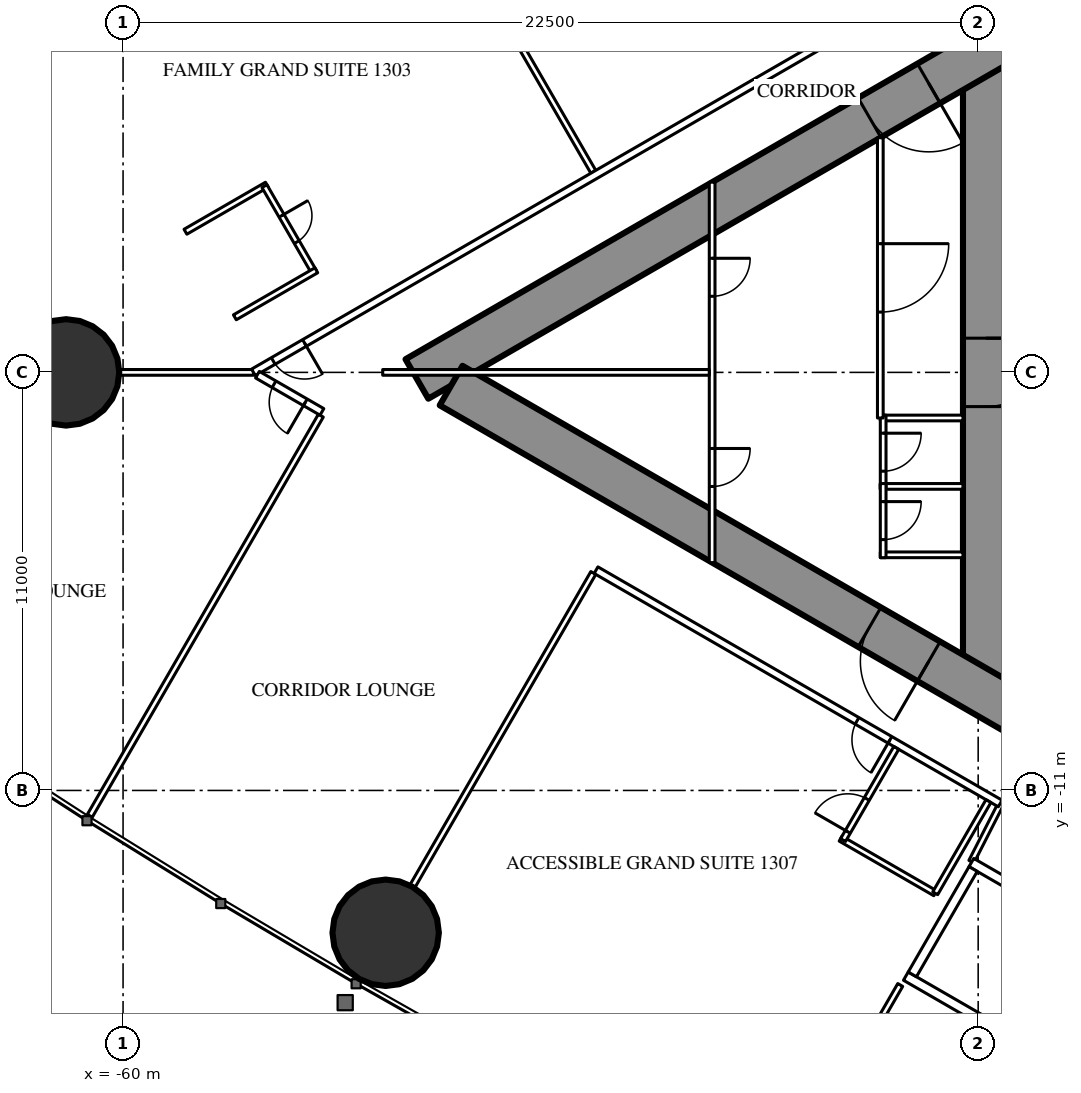
"""IFC4 building model, lengths in metres.
Left out: names, types, materials, properties, quantities, classifications, styles, units other than length and angle.
Written with IfcOpenShell. Run it as: python <this file> out.ifc"""

import sys

from ifc_helpers import new_model, si_unit, direction, frame, frame_2d, origin, origin_2d, place, context, subcontext, project, spatial, rectangle, hollow_circle, extrude, element, fill, save


model = new_model("IFC4")
c1 = context("Model", 3, precision=1e-05, world=origin(), true_north=direction((0.0, 1.0)))
c2 = subcontext(c1, "Body", "Model", "MODEL_VIEW")
j1 = project(units=[si_unit("LENGTHUNIT", "METRE"), si_unit("PLANEANGLEUNIT", "RADIAN")], contexts=[c1])
p1 = place(None, origin())
s1 = spatial("IfcSite", under=j1, at=p1, CompositionType="ELEMENT")
p2 = place(p1, origin())
s2 = spatial("IfcBuilding", under=s1, at=p2, CompositionType="ELEMENT")
p3 = place(p2, frame((0.0, 0.0, 53.0)))
s3 = spatial("IfcBuildingStorey", under=s2, at=p3, CompositionType="ELEMENT", Elevation=53.0)
p4 = place(p3, frame((-53.09, -14.745, 0.0), z_axis=(0.0, 0.0, 1.0), x_axis=(1.0, 0.0, 0.0)))
e1 = element("IfcColumn", 1, at=p4, inside=s3, PredefinedType="COLUMN", context=c2, shape_type="SweptSolid", body=[
    extrude(hollow_circle(Radius=1.4, WallThickness=0.12, at=origin_2d()), origin(), (0.0, 0.0, 1.0), 3.5),
])
p5 = place(p3, frame((-61.5, 0.0, 0.0), z_axis=(0.0, 0.0, 1.0), x_axis=(1.0, 0.0, 0.0)))
e2 = element("IfcColumn", 2, at=p5, inside=s3, PredefinedType="COLUMN", context=c2, shape_type="SweptSolid", body=[
    extrude(hollow_circle(Radius=1.4, WallThickness=0.1, at=origin_2d()), origin(), (0.0, 0.0, 1.0), 3.5),
])
p6 = place(p3, frame((-37.3, 8.6, 0.0), z_axis=(0.0, 0.0, 1.0), x_axis=(0.0, -1.0, 0.0)))
e3 = element("IfcWall", 3, at=p6, inside=s3, PredefinedType="SHEAR", context=c2, shape_type="SweptSolid", body=[
    extrude(rectangle(XDim=17.2, YDim=1.2, at=frame_2d((8.6, 0.0))), origin(), (0.0, 0.0, 1.0), 3.5),
])
p7 = place(p6, frame((7.7, 0.0, 0.0)))
e4 = element("IfcOpeningElement", 4, at=p7, cuts=e3, PredefinedType="OPENING", context=c2, shape_type="SweptSolid", body=[
    extrude(rectangle(XDim=1.8, YDim=2.2, at=frame_2d((0.9, 1.1))), frame((0.0, 0.61, 0.0), z_axis=(0.0, -1.0, 0.0), x_axis=(1.0, 0.0, 0.0)), (0.0, 0.0, 1.0), 1.22),
])
p8 = place(p3, frame((-27.2, 14.3, 0.0), z_axis=(0.0, 0.0, 1.0), x_axis=(-0.866026593062, -0.499997940104, 0.0)))
e5 = element("IfcWall", 5, at=p8, inside=s3, PredefinedType="SHEAR", context=c2, shape_type="SweptSolid", body=[
    extrude(rectangle(XDim=28.946, YDim=1.2, at=frame_2d((14.473, 0.0))), origin(), (0.0, 0.0, 1.0), 3.5),
])
p9 = place(p8, frame((4.6, 0.0, 0.0)))
e6 = element("IfcOpeningElement", 6, at=p9, cuts=e5, PredefinedType="OPENING", context=c2, shape_type="SweptSolid", body=[
    extrude(rectangle(XDim=1.0, YDim=2.2, at=frame_2d((0.5, 1.1))), frame((0.0, 0.61, 0.0), z_axis=(0.0, -1.0, 0.0), x_axis=(1.0, 0.0, 0.0)), (0.0, 0.0, 1.0), 1.22),
])
p10 = place(p8, frame((13.395, 0.0, 0.0)))
e7 = element("IfcOpeningElement", 7, at=p10, cuts=e5, PredefinedType="OPENING", context=c2, shape_type="SweptSolid", body=[
    extrude(rectangle(XDim=1.8, YDim=2.2, at=frame_2d((0.9, 1.1))), frame((0.0, 0.61, 0.0), z_axis=(0.0, -1.0, 0.0), x_axis=(1.0, 0.0, 0.0)), (0.0, 0.0, 1.0), 1.22),
])
p11 = place(p3, frame((-27.2, -14.3, 0.0), z_axis=(0.0, 0.0, 1.0), x_axis=(-0.866024021859, 0.500002393557, 0.0)))
e8 = element("IfcWall", 8, at=p11, inside=s3, PredefinedType="SHEAR", context=c2, shape_type="SweptSolid", body=[
    extrude(rectangle(XDim=27.907, YDim=1.2, at=frame_2d((13.954, 0.0))), origin(), (0.0, 0.0, 1.0), 3.5),
])
p12 = place(p11, frame((4.6, 0.0, 0.0)))
e9 = element("IfcOpeningElement", 9, at=p12, cuts=e8, PredefinedType="OPENING", context=c2, shape_type="SweptSolid", body=[
    extrude(rectangle(XDim=1.0, YDim=2.2, at=frame_2d((0.5, 1.1))), frame((0.0, 0.61, 0.0), z_axis=(0.0, -1.0, 0.0), x_axis=(1.0, 0.0, 0.0)), (0.0, 0.0, 1.0), 1.22),
])
p13 = place(p11, frame((13.395, 0.0, 0.0)))
e10 = element("IfcOpeningElement", 10, at=p13, cuts=e8, PredefinedType="OPENING", context=c2, shape_type="SweptSolid", body=[
    extrude(rectangle(XDim=1.8, YDim=2.2, at=frame_2d((0.9, 1.1))), frame((0.0, 0.61, 0.0), z_axis=(0.0, -1.0, 0.0), x_axis=(1.0, 0.0, 0.0)), (0.0, 0.0, 1.0), 1.22),
])
for number, where, z_axis, x_axis in (
    (11, (-47.627, 5.278, 0.0), (0.0, 0.0, 1.0), (-0.5, 0.866, 0.0)),
    (12, (-47.627, -5.278, 0.0), (0.0, 0.0, 1.0), (-0.5, -0.866, 0.0)),
):
    element("IfcWall", number, at=place(p3, frame(where, z_axis=z_axis, x_axis=x_axis)), inside=s3, PredefinedType="PARTITIONING", context=c2, shape_type="SweptSolid", body=[
        extrude(rectangle(XDim=9.51, YDim=0.15, at=frame_2d((4.755, 0.0))), origin(), (0.0, 0.0, 1.0), 2.25),
    ])
p14 = place(p3, frame((-54.796, -1.139, 0.0), z_axis=(0.0, 0.0, 1.0), x_axis=(-0.499998860433, -0.866026061713, 0.0)))
e13 = element("IfcWall", 13, at=p14, inside=s3, PredefinedType="PARTITIONING", context=c2, shape_type="SweptSolid", body=[
    extrude(rectangle(XDim=12.157, YDim=0.15, at=frame_2d((6.078, 0.0))), origin(), (0.0, 0.0, 1.0), 3.25),
])
p15 = place(p3, frame((-56.568, 0.0, 0.0), z_axis=(0.0, 0.0, 1.0), x_axis=(-1.0, 0.0, 0.0)))
e14 = element("IfcWall", 14, at=p15, inside=s3, PredefinedType="PARTITIONING", context=c2, shape_type="SweptSolid", body=[
    extrude(rectangle(XDim=16.247, YDim=0.15, at=frame_2d((8.124, 0.0))), origin(), (0.0, 0.0, 1.0), 2.25),
])
p16 = place(p3, frame((-39.551, -16.118, 0.0), z_axis=(0.0, 0.0, 1.0), x_axis=(-0.499986503906, -0.866033195618, 0.0)))
e15 = element("IfcWall", 15, at=p16, inside=s3, PredefinedType="PARTITIONING", context=c2, shape_type="SweptSolid", body=[
    extrude(rectangle(XDim=3.815, YDim=0.15, at=frame_2d((1.907, 0.0))), origin(), (0.0, 0.0, 1.0), 3.25),
])
p17 = place(p3, frame((-37.7, 10.894, 0.0), z_axis=(0.0, 0.0, 1.0), x_axis=(-0.866027905338, -0.499995667157, 0.0)))
e16 = element("IfcWall", 16, at=p17, inside=s3, PredefinedType="PARTITIONING", context=c2, shape_type="SweptSolid", body=[
    extrude(rectangle(XDim=21.787, YDim=0.2, at=frame_2d((10.894, 0.0))), origin(), (0.0, 0.0, 1.0), 3.25),
])
p18 = place(p17, frame((20.237, 0.0, 0.0)))
e17 = element("IfcOpeningElement", 17, at=p18, cuts=e16, PredefinedType="OPENING", context=c2, shape_type="SweptSolid", body=[
    extrude(rectangle(XDim=0.95, YDim=2.2, at=frame_2d((0.475, 1.1))), frame((0.0, 0.11, 0.0), z_axis=(0.0, -1.0, 0.0), x_axis=(1.0, 0.0, 0.0)), (0.0, 0.0, 1.0), 0.22),
])
p19 = place(p17, frame((2.95, 0.0, 0.0)))
e18 = element("IfcOpeningElement", 18, at=p19, cuts=e16, PredefinedType="OPENING", context=c2, shape_type="SweptSolid", body=[
    extrude(rectangle(XDim=0.95, YDim=2.2, at=frame_2d((0.475, 1.1))), frame((0.0, 0.11, 0.0), z_axis=(0.0, -1.0, 0.0), x_axis=(1.0, 0.0, 0.0)), (0.0, 0.0, 1.0), 0.22),
])
p20 = place(p3, frame((-36.857, -11.265, 0.0), z_axis=(0.0, 0.0, 1.0), x_axis=(-0.454225294761, -0.890886851176, 0.0)))
e19 = element("IfcWall", 19, at=p20, inside=s3, PredefinedType="PARTITIONING", context=c2, shape_type="SweptSolid", body=[
    extrude(rectangle(XDim=1.807, YDim=0.15, at=frame_2d((0.904, 0.0))), origin(), (0.0, 0.0, 1.0), 3.25),
])
p21 = place(p3, frame((-36.92, -11.344, 0.0), z_axis=(0.0, 0.0, 1.0), x_axis=(-0.866025017052, 0.500000669839, 0.0)))
e20 = element("IfcWall", 20, at=p21, inside=s3, PredefinedType="PARTITIONING", context=c2, shape_type="SweptSolid", body=[
    extrude(rectangle(XDim=12.28, YDim=0.2, at=frame_2d((6.14, 0.0))), origin(), (0.0, 0.0, 1.0), 3.25),
])
p22 = place(p21, frame((3.35, 0.0, 0.0)))
e21 = element("IfcOpeningElement", 21, at=p22, cuts=e20, PredefinedType="OPENING", context=c2, shape_type="SweptSolid", body=[
    extrude(rectangle(XDim=1.0, YDim=2.2, at=frame_2d((0.5, 1.1))), frame((0.0, 0.11, 0.0), z_axis=(0.0, -1.0, 0.0), x_axis=(1.0, 0.0, 0.0)), (0.0, 0.0, 1.0), 0.22),
])
p23 = place(p3, frame((-54.768, -1.04, 0.0), z_axis=(0.0, 0.0, 1.0), x_axis=(-0.866056934013, 0.499945384066, 0.0)))
e22 = element("IfcWall", 22, at=p23, inside=s3, PredefinedType="PARTITIONING", context=c2, shape_type="SweptSolid", body=[
    extrude(rectangle(XDim=1.959, YDim=0.2, at=frame_2d((0.979, 0.0))), origin(), (0.0, 0.0, 1.0), 3.25),
])
p24 = place(p23, frame((0.505, 0.0, 0.0)))
e23 = element("IfcOpeningElement", 23, at=p24, cuts=e22, PredefinedType="OPENING", context=c2, shape_type="SweptSolid", body=[
    extrude(rectangle(XDim=0.95, YDim=2.2, at=frame_2d((0.475, 1.1))), frame((0.0, 0.11, 0.0), z_axis=(0.0, -1.0, 0.0), x_axis=(1.0, 0.0, 0.0)), (0.0, 0.0, 1.0), 0.22),
])
p25 = place(p3, frame((-56.215, 4.938, 0.0), z_axis=(0.0, 0.0, 1.0), x_axis=(-0.866006523861, -0.500032699561, 0.0)))
e24 = element("IfcWall", 24, at=p25, inside=s3, PredefinedType="PARTITIONING", context=c2, shape_type="SweptSolid", body=[
    extrude(rectangle(XDim=2.475, YDim=0.15, at=frame_2d((1.237, 0.0))), origin(), (0.0, 0.0, 1.0), 3.25),
])
p26 = place(p3, frame((-54.98, 2.649, 0.0), z_axis=(0.0, 0.0, 1.0), x_axis=(-0.500006934395, 0.866021400173, 0.0)))
e25 = element("IfcWall", 25, at=p26, inside=s3, PredefinedType="PARTITIONING", context=c2, shape_type="SweptSolid", body=[
    extrude(rectangle(XDim=2.6, YDim=0.15, at=frame_2d((1.3, 0.0))), origin(), (0.0, 0.0, 1.0), 3.25),
])
p27 = place(p26, frame((0.9, 0.0, 0.0)))
e26 = element("IfcOpeningElement", 26, at=p27, cuts=e25, PredefinedType="OPENING", context=c2, shape_type="SweptSolid", body=[
    extrude(rectangle(XDim=0.8, YDim=2.2, at=frame_2d((0.4, 1.1))), frame((0.0, 0.085, 0.0), z_axis=(0.0, -1.0, 0.0), x_axis=(1.0, 0.0, 0.0)), (0.0, 0.0, 1.0), 0.17),
])
p28 = place(p3, frame((-54.915, 2.687, 0.0), z_axis=(0.0, 0.0, 1.0), x_axis=(-0.866006523861, -0.500032699561, 0.0)))
e27 = element("IfcWall", 27, at=p28, inside=s3, PredefinedType="PARTITIONING", context=c2, shape_type="SweptSolid", body=[
    extrude(rectangle(XDim=2.475, YDim=0.15, at=frame_2d((1.237, 0.0))), origin(), (0.0, 0.0, 1.0), 3.25),
])
p29 = place(p3, frame((-38.63, -13.705, 0.0), z_axis=(0.0, 0.0, 1.0), x_axis=(-0.866018712932, 0.500011588718, 0.0)))
e28 = element("IfcWall", 28, at=p29, inside=s3, PredefinedType="PARTITIONING", context=c2, shape_type="SweptSolid", body=[
    extrude(rectangle(XDim=2.875, YDim=0.15, at=frame_2d((1.438, 0.0))), origin(), (0.0, 0.0, 1.0), 3.25),
])
p30 = place(p3, frame((-39.655, -9.88, 0.0), z_axis=(0.0, 0.0, 1.0), x_axis=(-0.500049511043, -0.865996816683, 0.0)))
e29 = element("IfcWall", 29, at=p30, inside=s3, PredefinedType="PARTITIONING", context=c2, shape_type="SweptSolid", body=[
    extrude(rectangle(XDim=2.8, YDim=0.15, at=frame_2d((1.4, 0.0))), origin(), (0.0, 0.0, 1.0), 3.25),
])
p31 = place(p30, frame((1.55, 0.0, 0.0)))
e30 = element("IfcOpeningElement", 30, at=p31, cuts=e29, PredefinedType="OPENING", context=c2, shape_type="SweptSolid", body=[
    extrude(rectangle(XDim=1.0, YDim=2.2, at=frame_2d((0.5, 1.1))), frame((0.0, 0.085, 0.0), z_axis=(0.0, -1.0, 0.0), x_axis=(1.0, 0.0, 0.0)), (0.0, 0.0, 1.0), 0.17),
])
p32 = place(p3, frame((-37.23, -11.281, 0.0), z_axis=(0.0, 0.0, 1.0), x_axis=(-0.500049511043, -0.865996816683, 0.0)))
e31 = element("IfcWall", 31, at=p32, inside=s3, PredefinedType="PARTITIONING", context=c2, shape_type="SweptSolid", body=[
    extrude(rectangle(XDim=2.8, YDim=0.15, at=frame_2d((1.4, 0.0))), origin(), (0.0, 0.0, 1.0), 3.25),
])
for number, where, z_axis, x_axis in (
    (32, (-37.9, -1.2, 0.0), (0.0, 0.0, 1.0), (-1.0, 0.0, 0.0)),
    (33, (-37.9, -3.0, 0.0), (0.0, 0.0, 1.0), (-1.0, 0.0, 0.0)),
    (34, (-37.9, -4.8, 0.0), (0.0, 0.0, 1.0), (-1.0, 0.0, 0.0)),
):
    element("IfcWall", number, at=place(p3, frame(where, z_axis=z_axis, x_axis=x_axis)), inside=s3, PredefinedType="PARTITIONING", context=c2, shape_type="SweptSolid", body=[
        extrude(rectangle(XDim=2.175, YDim=0.15, at=frame_2d((1.087, 0.0))), origin(), (0.0, 0.0, 1.0), 3.25),
    ])
p33 = place(p3, frame((-40.0, -1.125, 0.0), z_axis=(0.0, 0.0, 1.0), x_axis=(0.0, -1.0, 0.0)))
e35 = element("IfcWall", 35, at=p33, inside=s3, PredefinedType="PARTITIONING", context=c2, shape_type="SweptSolid", body=[
    extrude(rectangle(XDim=1.95, YDim=0.15, at=frame_2d((0.975, 0.0))), origin(), (0.0, 0.0, 1.0), 3.25),
])
p34 = place(p33, frame((0.475, 0.0, 0.0)))
e36 = element("IfcOpeningElement", 36, at=p34, cuts=e35, PredefinedType="OPENING", context=c2, shape_type="SweptSolid", body=[
    extrude(rectangle(XDim=1.0, YDim=2.2, at=frame_2d((0.5, 1.1))), frame((0.0, 0.085, 0.0), z_axis=(0.0, -1.0, 0.0), x_axis=(1.0, 0.0, 0.0)), (0.0, 0.0, 1.0), 0.17),
])
p35 = place(p3, frame((-40.0, -2.925, 0.0), z_axis=(0.0, 0.0, 1.0), x_axis=(0.0, -1.0, 0.0)))
e37 = element("IfcWall", 37, at=p35, inside=s3, PredefinedType="PARTITIONING", context=c2, shape_type="SweptSolid", body=[
    extrude(rectangle(XDim=1.95, YDim=0.15, at=frame_2d((0.975, 0.0))), origin(), (0.0, 0.0, 1.0), 3.25),
])
p36 = place(p35, frame((0.475, 0.0, 0.0)))
e38 = element("IfcOpeningElement", 38, at=p36, cuts=e37, PredefinedType="OPENING", context=c2, shape_type="SweptSolid", body=[
    extrude(rectangle(XDim=1.0, YDim=2.2, at=frame_2d((0.5, 1.1))), frame((0.0, 0.085, 0.0), z_axis=(0.0, -1.0, 0.0), x_axis=(1.0, 0.0, 0.0)), (0.0, 0.0, 1.0), 0.17),
])
p37 = place(p3, frame((-40.075, 6.174, 0.0), z_axis=(0.0, 0.0, 1.0), x_axis=(0.0, -1.0, 0.0)))
e39 = element("IfcWall", 39, at=p37, inside=s3, PredefinedType="PARTITIONING", context=c2, shape_type="SweptSolid", body=[
    extrude(rectangle(XDim=7.374, YDim=0.15, at=frame_2d((3.687, 0.0))), origin(), (0.0, 0.0, 1.0), 3.25),
])
p38 = place(p37, frame((2.787, 0.0, 0.0)))
e40 = element("IfcOpeningElement", 40, at=p38, cuts=e39, PredefinedType="OPENING", context=c2, shape_type="SweptSolid", body=[
    extrude(rectangle(XDim=1.8, YDim=2.2, at=frame_2d((0.9, 1.1))), frame((0.0, 0.085, 0.0), z_axis=(0.0, -1.0, 0.0), x_axis=(1.0, 0.0, 0.0)), (0.0, 0.0, 1.0), 0.17),
])
p39 = place(p3, frame((-44.5, 5.005, 0.0), z_axis=(0.0, 0.0, 1.0), x_axis=(0.0, -1.0, 0.0)))
e41 = element("IfcWall", 41, at=p39, inside=s3, PredefinedType="PARTITIONING", context=c2, shape_type="SweptSolid", body=[
    extrude(rectangle(XDim=10.009, YDim=0.15, at=frame_2d((5.005, 0.0))), origin(), (0.0, 0.0, 1.0), 2.45),
])
p40 = place(p39, frame((2.002, 0.0, 0.0)))
e42 = element("IfcOpeningElement", 42, at=p40, cuts=e41, PredefinedType="OPENING", context=c2, shape_type="SweptSolid", body=[
    extrude(rectangle(XDim=1.0, YDim=2.2, at=frame_2d((0.5, 1.1))), frame((0.0, 0.085, 0.0), z_axis=(0.0, -1.0, 0.0), x_axis=(1.0, 0.0, 0.0)), (0.0, 0.0, 1.0), 0.17),
])
p41 = place(p39, frame((7.007, 0.0, 0.0)))
e43 = element("IfcOpeningElement", 43, at=p41, cuts=e41, PredefinedType="OPENING", context=c2, shape_type="SweptSolid", body=[
    extrude(rectangle(XDim=1.0, YDim=2.2, at=frame_2d((0.5, 1.1))), frame((0.0, 0.085, 0.0), z_axis=(0.0, -1.0, 0.0), x_axis=(1.0, 0.0, 0.0)), (0.0, 0.0, 1.0), 0.17),
])
p42 = place(p3, frame((-44.575, 0.0, 0.0), z_axis=(0.0, 0.0, 1.0), x_axis=(-1.0, 0.0, 0.0)))
e44 = element("IfcWall", 44, at=p42, inside=s3, PredefinedType="PARTITIONING", context=c2, shape_type="SweptSolid", body=[
    extrude(rectangle(XDim=8.593, YDim=0.15, at=frame_2d((4.297, 0.0))), origin(), (0.0, 0.0, 1.0), 2.25),
])
p43 = place(p3, frame((-33.696, -15.197, 0.0), z_axis=(0.0, 0.0, 1.0), x_axis=(-0.865976953817, 0.500083908417, 0.0)))
e45 = element("IfcWall", 45, at=p43, inside=s3, PredefinedType="PARTITIONING", context=c2, shape_type="SweptSolid", body=[
    extrude(rectangle(XDim=4.599, YDim=0.25, at=frame_2d((2.3, 0.0))), origin(), (0.0, 0.0, 1.0), 3.25),
])
p44 = place(p3, frame((-35.42, -18.186, 0.0), z_axis=(0.0, 0.0, 1.0), x_axis=(-0.865990227814, 0.50006092162, 0.0)))
e46 = element("IfcWall", 46, at=p44, inside=s3, PredefinedType="PARTITIONING", context=c2, shape_type="SweptSolid", body=[
    extrude(rectangle(XDim=4.6, YDim=0.25, at=frame_2d((2.3, 0.0))), origin(), (0.0, 0.0, 1.0), 3.25),
])
p45 = place(p3, frame((-37.633, -13.068, 0.0), z_axis=(0.0, 0.0, 1.0), x_axis=(-0.499872130319, -0.866099216793, 0.0)))
e47 = element("IfcWall", 47, at=p45, inside=s3, PredefinedType="PARTITIONING", context=c2, shape_type="SweptSolid", body=[
    extrude(rectangle(XDim=3.2, YDim=0.25, at=frame_2d((1.6, 0.0))), origin(), (0.0, 0.0, 1.0), 3.25),
])
p46 = place(p27, origin())
e48 = element("IfcDoor", 48, at=p46, inside=s3, OperationType="SINGLE_SWING_RIGHT", PredefinedType="DOOR", context=c2, shape_type="SweptSolid", body=[
    extrude(rectangle(XDim=0.8, YDim=2.2, at=frame_2d((0.4, 1.1))), frame((0.0, 0.025, 0.0), z_axis=(0.0, -1.0, 0.0), x_axis=(1.0, 0.0, 0.0)), (0.0, 0.0, 1.0), 0.05),
])
fill(e26, e48)
p47 = place(p18, origin())
e49 = element("IfcDoor", 49, at=p47, inside=s3, OperationType="SINGLE_SWING_LEFT", PredefinedType="DOOR", context=c2, shape_type="SweptSolid", body=[
    extrude(rectangle(XDim=0.95, YDim=2.2, at=frame_2d((0.475, 1.1))), frame((0.0, 0.025, 0.0), z_axis=(0.0, -1.0, 0.0), x_axis=(1.0, 0.0, 0.0)), (0.0, 0.0, 1.0), 0.05),
])
fill(e17, e49)
p48 = place(p24, origin())
e50 = element("IfcDoor", 50, at=p48, inside=s3, OperationType="SINGLE_SWING_LEFT", PredefinedType="DOOR", context=c2, shape_type="SweptSolid", body=[
    extrude(rectangle(XDim=0.95, YDim=2.2, at=frame_2d((0.475, 1.1))), frame((0.0, 0.025, 0.0), z_axis=(0.0, -1.0, 0.0), x_axis=(1.0, 0.0, 0.0)), (0.0, 0.0, 1.0), 0.05),
])
fill(e23, e50)
p49 = place(p31, origin())
e51 = element("IfcDoor", 51, at=p49, inside=s3, OperationType="SINGLE_SWING_RIGHT", PredefinedType="DOOR", context=c2, shape_type="SweptSolid", body=[
    extrude(rectangle(XDim=1.0, YDim=2.2, at=frame_2d((0.5, 1.1))), frame((0.0, 0.025, 0.0), z_axis=(0.0, -1.0, 0.0), x_axis=(1.0, 0.0, 0.0)), (0.0, 0.0, 1.0), 0.05),
])
fill(e30, e51)
p50 = place(p22, origin())
e52 = element("IfcDoor", 52, at=p50, inside=s3, OperationType="SINGLE_SWING_LEFT", PredefinedType="DOOR", context=c2, shape_type="SweptSolid", body=[
    extrude(rectangle(XDim=1.0, YDim=2.2, at=frame_2d((0.5, 1.1))), frame((0.0, 0.025, 0.0), z_axis=(0.0, -1.0, 0.0), x_axis=(1.0, 0.0, 0.0)), (0.0, 0.0, 1.0), 0.05),
])
fill(e21, e52)
p51 = place(p34, origin())
e53 = element("IfcDoor", 53, at=p51, inside=s3, OperationType="SINGLE_SWING_LEFT", PredefinedType="DOOR", context=c2, shape_type="SweptSolid", body=[
    extrude(rectangle(XDim=1.0, YDim=2.2, at=frame_2d((0.5, 1.1))), frame((0.0, 0.025, 0.0), z_axis=(0.0, -1.0, 0.0), x_axis=(1.0, 0.0, 0.0)), (0.0, 0.0, 1.0), 0.05),
])
fill(e36, e53)
p52 = place(p36, origin())
e54 = element("IfcDoor", 54, at=p52, inside=s3, OperationType="SINGLE_SWING_LEFT", PredefinedType="DOOR", context=c2, shape_type="SweptSolid", body=[
    extrude(rectangle(XDim=1.0, YDim=2.2, at=frame_2d((0.5, 1.1))), frame((0.0, 0.025, 0.0), z_axis=(0.0, -1.0, 0.0), x_axis=(1.0, 0.0, 0.0)), (0.0, 0.0, 1.0), 0.05),
])
fill(e38, e54)
p53 = place(p38, origin())
e55 = element("IfcDoor", 55, at=p53, inside=s3, OperationType="DOUBLE_DOOR_SINGLE_SWING", PredefinedType="DOOR", context=c2, shape_type="SweptSolid", body=[
    extrude(rectangle(XDim=1.8, YDim=2.2, at=frame_2d((0.9, 1.1))), frame((0.0, 0.025, 0.0), z_axis=(0.0, -1.0, 0.0), x_axis=(1.0, 0.0, 0.0)), (0.0, 0.0, 1.0), 0.05),
])
fill(e40, e55)
p54 = place(p40, origin())
e56 = element("IfcDoor", 56, at=p54, inside=s3, OperationType="SINGLE_SWING_LEFT", PredefinedType="DOOR", context=c2, shape_type="SweptSolid", body=[
    extrude(rectangle(XDim=1.0, YDim=2.2, at=frame_2d((0.5, 1.1))), frame((0.0, 0.025, 0.0), z_axis=(0.0, -1.0, 0.0), x_axis=(1.0, 0.0, 0.0)), (0.0, 0.0, 1.0), 0.05),
])
fill(e42, e56)
p55 = place(p41, origin())
e57 = element("IfcDoor", 57, at=p55, inside=s3, OperationType="SINGLE_SWING_LEFT", PredefinedType="DOOR", context=c2, shape_type="SweptSolid", body=[
    extrude(rectangle(XDim=1.0, YDim=2.2, at=frame_2d((0.5, 1.1))), frame((0.0, 0.025, 0.0), z_axis=(0.0, -1.0, 0.0), x_axis=(1.0, 0.0, 0.0)), (0.0, 0.0, 1.0), 0.05),
])
fill(e43, e57)
p56 = place(p10, origin())
e58 = element("IfcDoor", 58, at=p56, inside=s3, OperationType="DOUBLE_DOOR_SINGLE_SWING", PredefinedType="DOOR", context=c2, shape_type="SweptSolid", body=[
    extrude(rectangle(XDim=1.8, YDim=2.2, at=frame_2d((0.9, 1.1))), frame((0.0, 0.025, 0.0), z_axis=(0.0, -1.0, 0.0), x_axis=(1.0, 0.0, 0.0)), (0.0, 0.0, 1.0), 0.05),
])
fill(e7, e58)
p57 = place(p13, origin())
e59 = element("IfcDoor", 59, at=p57, inside=s3, OperationType="DOUBLE_DOOR_SINGLE_SWING", PredefinedType="DOOR", context=c2, shape_type="SweptSolid", body=[
    extrude(rectangle(XDim=1.8, YDim=2.2, at=frame_2d((0.9, 1.1))), frame((0.0, 0.025, 0.0), z_axis=(0.0, -1.0, 0.0), x_axis=(1.0, 0.0, 0.0)), (0.0, 0.0, 1.0), 0.05),
])
fill(e10, e59)
p58 = place(p7, origin())
e60 = element("IfcDoor", 60, at=p58, inside=s3, OperationType="DOUBLE_DOOR_SINGLE_SWING", PredefinedType="DOOR", context=c2, shape_type="SweptSolid", body=[
    extrude(rectangle(XDim=1.8, YDim=2.2, at=frame_2d((0.9, 1.1))), frame((0.0, 0.025, 0.0), z_axis=(0.0, -1.0, 0.0), x_axis=(1.0, 0.0, 0.0)), (0.0, 0.0, 1.0), 0.05),
])
fill(e4, e60)
save(model, sys.argv[1])
